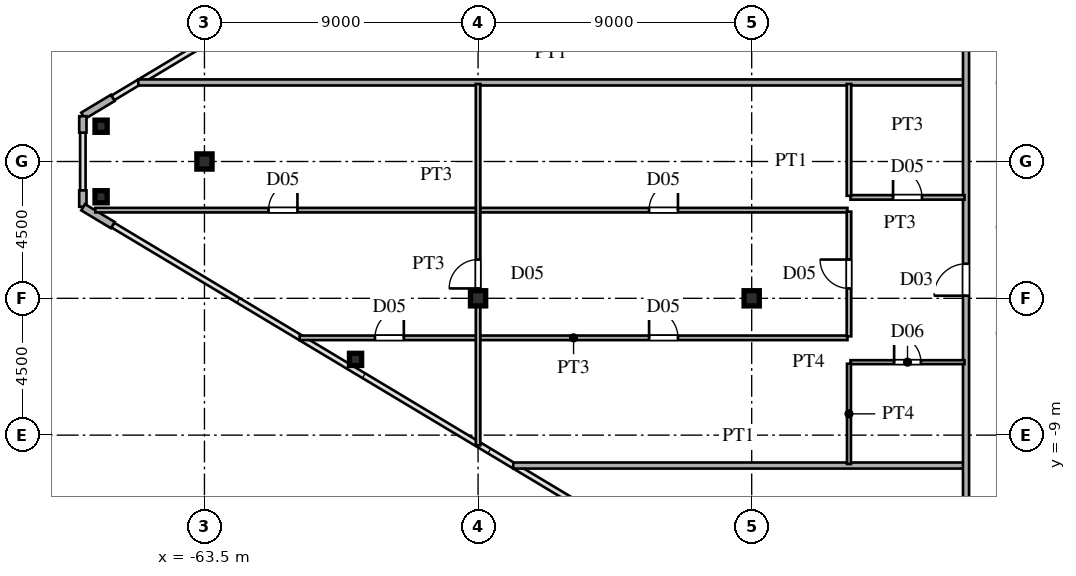
"""IFC4 building model, lengths in metres.
Left out: names, types, materials, properties, quantities, classifications, styles, units other than length and angle.
Written with IfcOpenShell. Run it as: python <this file> out.ifc"""

import sys

from ifc_helpers import new_model, si_unit, direction, frame, frame_2d, origin, origin_2d, place, context, subcontext, project, spatial, rectangle, hollow_rectangle, i_section, extrude, source, transform, mapped, element, fill, save


model = new_model("IFC4")
c1 = context("Model", 3, precision=1e-05, world=origin(), true_north=direction((0.0, 1.0)))
c2 = subcontext(c1, "Body", "Model", "MODEL_VIEW")
j1 = project(units=[si_unit("LENGTHUNIT", "METRE"), si_unit("PLANEANGLEUNIT", "RADIAN")], contexts=[c1])
p1 = place(None, origin())
s1 = spatial("IfcSite", under=j1, at=p1, CompositionType="ELEMENT")
p2 = place(p1, origin())
s2 = spatial("IfcBuilding", under=s1, at=p2, CompositionType="ELEMENT")
p3 = place(p2, frame((0.0, 0.0, 206.7)))
s3 = spatial("IfcBuildingStorey", under=s2, at=p3, CompositionType="ELEMENT", Elevation=206.7)
m1 = source(origin(), c2, "Body", "SweptSolid", [
    extrude(i_section(OverallWidth=0.5, OverallDepth=0.5, WebThickness=0.02, FlangeThickness=0.032, at=origin_2d()), origin(), (0.0, 0.0, 1.0), 3.6),
])
for number, where, z_axis, x_axis in (
    (1, (-45.5, -4.5, 0.0), (0.0, 0.0, 1.0), (1.0, 0.0, 0.0)),
    (2, (-54.5, -4.5, 0.0), (0.0, 0.0, 1.0), (1.0, 0.0, 0.0)),
    (3, (-63.5, 0.0, 0.0), (0.0, 0.0, 1.0), (1.0, 0.0, 0.0)),
):
    element("IfcColumn", number, at=place(p3, frame(where, z_axis=z_axis, x_axis=x_axis)), inside=s3, PredefinedType="COLUMN", context=c2, shape_type="MappedRepresentation", body=[
        mapped(m1, transform((0.0, 0.0, 0.0), scale=1.0)),
    ])
m2 = source(origin(), c2, "Body", "SweptSolid", [
    extrude(hollow_rectangle(XDim=0.4, YDim=0.4, WallThickness=0.016, at=origin_2d()), origin(), (0.0, 0.0, 1.0), 3.6),
])
for number, where, z_axis, x_axis in (
    (4, (-66.9, 1.16, 0.0), (0.0, 0.0, 1.0), (1.0, 0.0, 0.0)),
    (5, (-66.9, -1.16, 0.0), (0.0, 0.0, 1.0), (1.0, 0.0, 0.0)),
    (6, (-58.53, -6.509, 0.0), (0.0, 0.0, 1.0), (1.0, 0.0, 0.0)),
):
    element("IfcColumn", number, at=place(p3, frame(where, z_axis=z_axis, x_axis=x_axis)), inside=s3, PredefinedType="COLUMN", context=c2, shape_type="MappedRepresentation", body=[
        mapped(m2, transform((0.0, 0.0, 0.0), scale=1.0)),
    ])
p4 = place(p3, frame((-66.514, 2.092, 0.0), z_axis=(0.0, 0.0, 1.0), x_axis=(-0.85743623509, -0.514590228002, 0.0)))
e7 = element("IfcWall", 7, at=p4, inside=s3, PredefinedType="SOLIDWALL", context=c2, shape_type="SweptSolid", body=[
    extrude(rectangle(XDim=1.14, YDim=0.24, at=frame_2d((0.57, 0.0))), origin(), (0.0, 0.0, 1.0), 3.38),
])
for number, where, z_axis, x_axis in (
    (8, (-67.5, 1.49, 0.0), (0.0, 0.0, 1.0), (0.0, -1.0, 0.0)),
    (9, (-67.5, -0.95, 0.0), (0.0, 0.0, 1.0), (0.0, -1.0, 0.0)),
):
    element("IfcWall", number, at=place(p3, frame(where, z_axis=z_axis, x_axis=x_axis)), inside=s3, PredefinedType="SOLIDWALL", context=c2, shape_type="SweptSolid", body=[
        extrude(rectangle(XDim=0.54, YDim=0.24, at=frame_2d((0.27, 0.0))), origin(), (0.0, 0.0, 1.0), 3.38),
    ])
p5 = place(p3, frame((-67.491, -1.505, 0.0), z_axis=(0.0, 0.0, 1.0), x_axis=(0.85743623509, -0.514590228002, 0.0)))
e10 = element("IfcWall", 10, at=p5, inside=s3, PredefinedType="SOLIDWALL", context=c2, shape_type="SweptSolid", body=[
    extrude(rectangle(XDim=1.14, YDim=0.24, at=frame_2d((0.57, 0.0))), origin(), (0.0, 0.0, 1.0), 3.38),
])
p6 = place(p3, frame((-53.343, -10.0, 0.0), z_axis=(0.0, 0.0, 1.0), x_axis=(1.0, 0.0, 0.0)))
e11 = element("IfcWall", 11, at=p6, inside=s3, PredefinedType="PARTITIONING", context=c2, shape_type="SweptSolid", body=[
    extrude(rectangle(XDim=14.813, YDim=0.2, at=frame_2d((7.406, 0.0))), origin(), (0.0, 0.0, 1.0), 3.38),
])
p7 = place(p3, frame((-42.25, -6.6, 0.0), z_axis=(0.0, 0.0, 1.0), x_axis=(1.0, 0.0, 0.0)))
e12 = element("IfcWall", 12, at=p7, inside=s3, PredefinedType="PARTITIONING", context=c2, shape_type="SweptSolid", body=[
    extrude(rectangle(XDim=3.75, YDim=0.13, at=frame_2d((1.875, 0.0))), origin(), (0.0, 0.0, 1.0), 3.38),
])
p8 = place(p7, frame((1.435, 0.0, 0.0)))
e13 = element("IfcOpeningElement", 13, at=p8, cuts=e12, PredefinedType="OPENING", context=c2, shape_type="SweptSolid", body=[
    extrude(rectangle(XDim=0.88, YDim=2.1, at=frame_2d((0.44, 1.05))), frame((0.0, 0.075, 0.0), z_axis=(0.0, -1.0, 0.0), x_axis=(1.0, 0.0, 0.0)), (0.0, 0.0, 1.0), 0.15),
])
p9 = place(p3, frame((-60.368, -5.8, 0.0), z_axis=(0.0, 0.0, 1.0), x_axis=(1.0, 0.0, 0.0)))
e14 = element("IfcWall", 14, at=p9, inside=s3, PredefinedType="PARTITIONING", context=c2, shape_type="SweptSolid", body=[
    extrude(rectangle(XDim=18.018, YDim=0.15, at=frame_2d((9.009, 0.0))), origin(), (0.0, 0.0, 1.0), 3.38),
])
p10 = place(p9, frame((11.493, 0.0, 0.0)))
e15 = element("IfcOpeningElement", 15, at=p10, cuts=e14, PredefinedType="OPENING", context=c2, shape_type="SweptSolid", body=[
    extrude(rectangle(XDim=0.95, YDim=2.15, at=frame_2d((0.475, 1.075))), frame((0.0, 0.085, 0.0), z_axis=(0.0, -1.0, 0.0), x_axis=(1.0, 0.0, 0.0)), (0.0, 0.0, 1.0), 0.17),
])
p11 = place(p9, frame((2.476, 0.0, 0.0)))
e16 = element("IfcOpeningElement", 16, at=p11, cuts=e14, PredefinedType="OPENING", context=c2, shape_type="SweptSolid", body=[
    extrude(rectangle(XDim=0.95, YDim=2.15, at=frame_2d((0.475, 1.075))), frame((0.0, 0.085, 0.0), z_axis=(0.0, -1.0, 0.0), x_axis=(1.0, 0.0, 0.0)), (0.0, 0.0, 1.0), 0.17),
])
p12 = place(p3, frame((-67.09, -1.6, 0.0), z_axis=(0.0, 0.0, 1.0), x_axis=(1.0, 0.0, 0.0)))
e17 = element("IfcWall", 17, at=p12, inside=s3, PredefinedType="PARTITIONING", context=c2, shape_type="SweptSolid", body=[
    extrude(rectangle(XDim=24.74, YDim=0.15, at=frame_2d((12.37, 0.0))), origin(), (0.0, 0.0, 1.0), 3.38),
])
p13 = place(p12, frame((18.215, 0.0, 0.0)))
e18 = element("IfcOpeningElement", 18, at=p13, cuts=e17, PredefinedType="OPENING", context=c2, shape_type="SweptSolid", body=[
    extrude(rectangle(XDim=0.95, YDim=2.15, at=frame_2d((0.475, 1.075))), frame((0.0, 0.085, 0.0), z_axis=(0.0, -1.0, 0.0), x_axis=(1.0, 0.0, 0.0)), (0.0, 0.0, 1.0), 0.17),
])
p14 = place(p12, frame((5.698, 0.0, 0.0)))
e19 = element("IfcOpeningElement", 19, at=p14, cuts=e17, PredefinedType="OPENING", context=c2, shape_type="SweptSolid", body=[
    extrude(rectangle(XDim=0.95, YDim=2.15, at=frame_2d((0.475, 1.075))), frame((0.0, 0.085, 0.0), z_axis=(0.0, -1.0, 0.0), x_axis=(1.0, 0.0, 0.0)), (0.0, 0.0, 1.0), 0.17),
])
p15 = place(p3, frame((-42.25, -1.18, 0.0), z_axis=(0.0, 0.0, 1.0), x_axis=(1.0, 0.0, 0.0)))
e20 = element("IfcWall", 20, at=p15, inside=s3, PredefinedType="PARTITIONING", context=c2, shape_type="SweptSolid", body=[
    extrude(rectangle(XDim=3.75, YDim=0.15, at=frame_2d((1.875, 0.0))), origin(), (0.0, 0.0, 1.0), 3.38),
])
p16 = place(p15, frame((1.4, 0.0, 0.0)))
e21 = element("IfcOpeningElement", 21, at=p16, cuts=e20, PredefinedType="OPENING", context=c2, shape_type="SweptSolid", body=[
    extrude(rectangle(XDim=0.95, YDim=2.15, at=frame_2d((0.475, 1.075))), frame((0.0, 0.085, 0.0), z_axis=(0.0, -1.0, 0.0), x_axis=(1.0, 0.0, 0.0)), (0.0, 0.0, 1.0), 0.17),
])
p17 = place(p3, frame((-65.676, 2.6, 0.0), z_axis=(0.0, 0.0, 1.0), x_axis=(1.0, 0.0, 0.0)))
e22 = element("IfcWall", 22, at=p17, inside=s3, PredefinedType="PARTITIONING", context=c2, shape_type="SweptSolid", body=[
    extrude(rectangle(XDim=27.146, YDim=0.2, at=frame_2d((13.573, 0.0))), origin(), (0.0, 0.0, 1.0), 3.38),
])
p18 = place(p3, frame((-54.5, -9.335, 0.0), z_axis=(0.0, 0.0, 1.0), x_axis=(0.0, 1.0, 0.0)))
e23 = element("IfcWall", 23, at=p18, inside=s3, PredefinedType="PARTITIONING", context=c2, shape_type="SweptSolid", body=[
    extrude(rectangle(XDim=11.885, YDim=0.15, at=frame_2d((5.942, 0.0))), origin(), (0.0, 0.0, 1.0), 2.78),
])
p19 = place(p18, frame((5.16, 0.0, 0.0)))
e24 = element("IfcOpeningElement", 24, at=p19, cuts=e23, PredefinedType="OPENING", context=c2, shape_type="SweptSolid", body=[
    extrude(rectangle(XDim=0.95, YDim=2.15, at=frame_2d((0.475, 1.075))), frame((0.0, 0.085, 0.0), z_axis=(0.0, -1.0, 0.0), x_axis=(1.0, 0.0, 0.0)), (0.0, 0.0, 1.0), 0.17),
])
p20 = place(p3, frame((-42.3, -9.95, 0.0), z_axis=(0.0, 0.0, 1.0), x_axis=(0.0, 1.0, 0.0)))
e25 = element("IfcWall", 25, at=p20, inside=s3, PredefinedType="PARTITIONING", context=c2, shape_type="SweptSolid", body=[
    extrude(rectangle(XDim=3.3, YDim=0.13, at=frame_2d((1.65, 0.0))), origin(), (0.0, 0.0, 1.0), 3.38),
])
p21 = place(p3, frame((-42.3, -5.75, 0.0), z_axis=(0.0, 0.0, 1.0), x_axis=(0.0, 1.0, 0.0)))
e26 = element("IfcWall", 26, at=p21, inside=s3, PredefinedType="PARTITIONING", context=c2, shape_type="SweptSolid", body=[
    extrude(rectangle(XDim=4.1, YDim=0.15, at=frame_2d((2.05, 0.0))), origin(), (0.0, 0.0, 1.0), 3.38),
])
p22 = place(p21, frame((1.575, 0.0, 0.0)))
e27 = element("IfcOpeningElement", 27, at=p22, cuts=e26, PredefinedType="OPENING", context=c2, shape_type="SweptSolid", body=[
    extrude(rectangle(XDim=0.95, YDim=2.15, at=frame_2d((0.475, 1.075))), frame((0.0, 0.085, 0.0), z_axis=(0.0, -1.0, 0.0), x_axis=(1.0, 0.0, 0.0)), (0.0, 0.0, 1.0), 0.17),
])
p23 = place(p3, frame((-42.3, -1.128, 0.0), z_axis=(0.0, 0.0, 1.0), x_axis=(0.0, 1.0, 0.0)))
e28 = element("IfcWall", 28, at=p23, inside=s3, PredefinedType="PARTITIONING", context=c2, shape_type="SweptSolid", body=[
    extrude(rectangle(XDim=3.678, YDim=0.15, at=frame_2d((1.839, 0.0))), origin(), (0.0, 0.0, 1.0), 3.38),
])
p24 = place(p3, frame((-38.45, -15.715, 0.0), z_axis=(0.0, 0.0, 1.0), x_axis=(0.0, 1.0, 0.0)))
e29 = element("IfcWall", 29, at=p24, inside=s3, PredefinedType="PARTITIONING", context=c2, shape_type="SweptSolid", body=[
    extrude(rectangle(XDim=31.43, YDim=0.2, at=frame_2d((15.715, 0.0))), origin(), (0.0, 0.0, 1.0), 3.38),
])
p25 = place(p24, frame((2.29, 0.0, 0.0)))
e30 = element("IfcOpeningElement", 30, at=p25, cuts=e29, PredefinedType="OPENING", context=c2, shape_type="SweptSolid", body=[
    extrude(rectangle(XDim=1.05, YDim=2.25, at=frame_2d((0.525, 1.125))), frame((0.0, 0.11, 0.0), z_axis=(0.0, -1.0, 0.0), x_axis=(1.0, 0.0, 0.0)), (0.0, 0.0, 1.0), 0.22),
])
p26 = place(p24, frame((11.301, 0.0, 0.0)))
e31 = element("IfcOpeningElement", 31, at=p26, cuts=e29, PredefinedType="OPENING", context=c2, shape_type="SweptSolid", body=[
    extrude(rectangle(XDim=1.05, YDim=2.25, at=frame_2d((0.525, 1.125))), frame((0.0, 0.11, 0.0), z_axis=(0.0, -1.0, 0.0), x_axis=(1.0, 0.0, 0.0)), (0.0, 0.0, 1.0), 0.22),
])
p27 = place(p24, frame((24.39, 0.0, 0.0)))
e32 = element("IfcOpeningElement", 32, at=p27, cuts=e29, PredefinedType="OPENING", context=c2, shape_type="SweptSolid", body=[
    extrude(rectangle(XDim=1.05, YDim=2.25, at=frame_2d((0.525, 1.125))), frame((0.0, 0.11, 0.0), z_axis=(0.0, -1.0, 0.0), x_axis=(1.0, 0.0, 0.0)), (0.0, 0.0, 1.0), 0.22),
])
m3 = source(origin(), c2, "Body", "SweptSolid", [
    extrude(rectangle(XDim=0.88, YDim=2.1, at=frame_2d((0.44, 1.05))), frame((0.0, 0.025, 0.0), z_axis=(0.0, -1.0, 0.0), x_axis=(1.0, 0.0, 0.0)), (0.0, 0.0, 1.0), 0.05),
])
p28 = place(p8, origin())
e33 = element("IfcDoor", 33, at=p28, inside=s3, OperationType="SINGLE_SWING_LEFT", PredefinedType="DOOR", context=c2, shape_type="MappedRepresentation", body=[
    mapped(m3, transform((0.0, 0.0, 0.0), scale=1.0)),
])
fill(e13, e33)
m4 = source(origin(), c2, "Body", "SweptSolid", [
    extrude(rectangle(XDim=0.95, YDim=2.15, at=frame_2d((0.475, 1.075))), frame((0.0, 0.025, 0.0), z_axis=(0.0, -1.0, 0.0), x_axis=(1.0, 0.0, 0.0)), (0.0, 0.0, 1.0), 0.05),
])
p29 = place(p10, origin())
e34 = element("IfcDoor", 34, at=p29, inside=s3, OperationType="SINGLE_SWING_LEFT", PredefinedType="DOOR", context=c2, shape_type="MappedRepresentation", body=[
    mapped(m4, transform((0.0, 0.0, 0.0), scale=1.0)),
])
fill(e15, e34)
p30 = place(p11, origin())
e35 = element("IfcDoor", 35, at=p30, inside=s3, OperationType="SINGLE_SWING_RIGHT", PredefinedType="DOOR", context=c2, shape_type="MappedRepresentation", body=[
    mapped(m4, transform((0.0, 0.0, 0.0), scale=1.0)),
])
fill(e16, e35)
p31 = place(p13, origin())
e36 = element("IfcDoor", 36, at=p31, inside=s3, OperationType="SINGLE_SWING_RIGHT", PredefinedType="DOOR", context=c2, shape_type="MappedRepresentation", body=[
    mapped(m4, transform((0.0, 0.0, 0.0), scale=1.0)),
])
fill(e18, e36)
p32 = place(p14, origin())
e37 = element("IfcDoor", 37, at=p32, inside=s3, OperationType="SINGLE_SWING_RIGHT", PredefinedType="DOOR", context=c2, shape_type="MappedRepresentation", body=[
    mapped(m4, transform((0.0, 0.0, 0.0), scale=1.0)),
])
fill(e19, e37)
p33 = place(p16, origin())
e38 = element("IfcDoor", 38, at=p33, inside=s3, OperationType="SINGLE_SWING_LEFT", PredefinedType="DOOR", context=c2, shape_type="MappedRepresentation", body=[
    mapped(m4, transform((0.0, 0.0, 0.0), scale=1.0)),
])
fill(e21, e38)
p34 = place(p19, origin())
e39 = element("IfcDoor", 39, at=p34, inside=s3, OperationType="SINGLE_SWING_LEFT", PredefinedType="DOOR", context=c2, shape_type="MappedRepresentation", body=[
    mapped(m4, transform((0.0, 0.0, 0.0), scale=1.0)),
])
fill(e24, e39)
p35 = place(p22, origin())
e40 = element("IfcDoor", 40, at=p35, inside=s3, OperationType="SINGLE_SWING_RIGHT", PredefinedType="DOOR", context=c2, shape_type="MappedRepresentation", body=[
    mapped(m4, transform((0.0, 0.0, 0.0), scale=1.0)),
])
fill(e27, e40)
m5 = source(origin(), c2, "Body", "SweptSolid", [
    extrude(rectangle(XDim=1.05, YDim=2.25, at=frame_2d((0.525, 1.125))), frame((0.0, 0.025, 0.0), z_axis=(0.0, -1.0, 0.0), x_axis=(1.0, 0.0, 0.0)), (0.0, 0.0, 1.0), 0.05),
])
p36 = place(p26, origin())
e41 = element("IfcDoor", 41, at=p36, inside=s3, OperationType="SINGLE_SWING_LEFT", PredefinedType="DOOR", context=c2, shape_type="MappedRepresentation", body=[
    mapped(m5, transform((0.0, 0.0, 0.0), scale=1.0)),
])
fill(e31, e41)
save(model, sys.argv[1])
